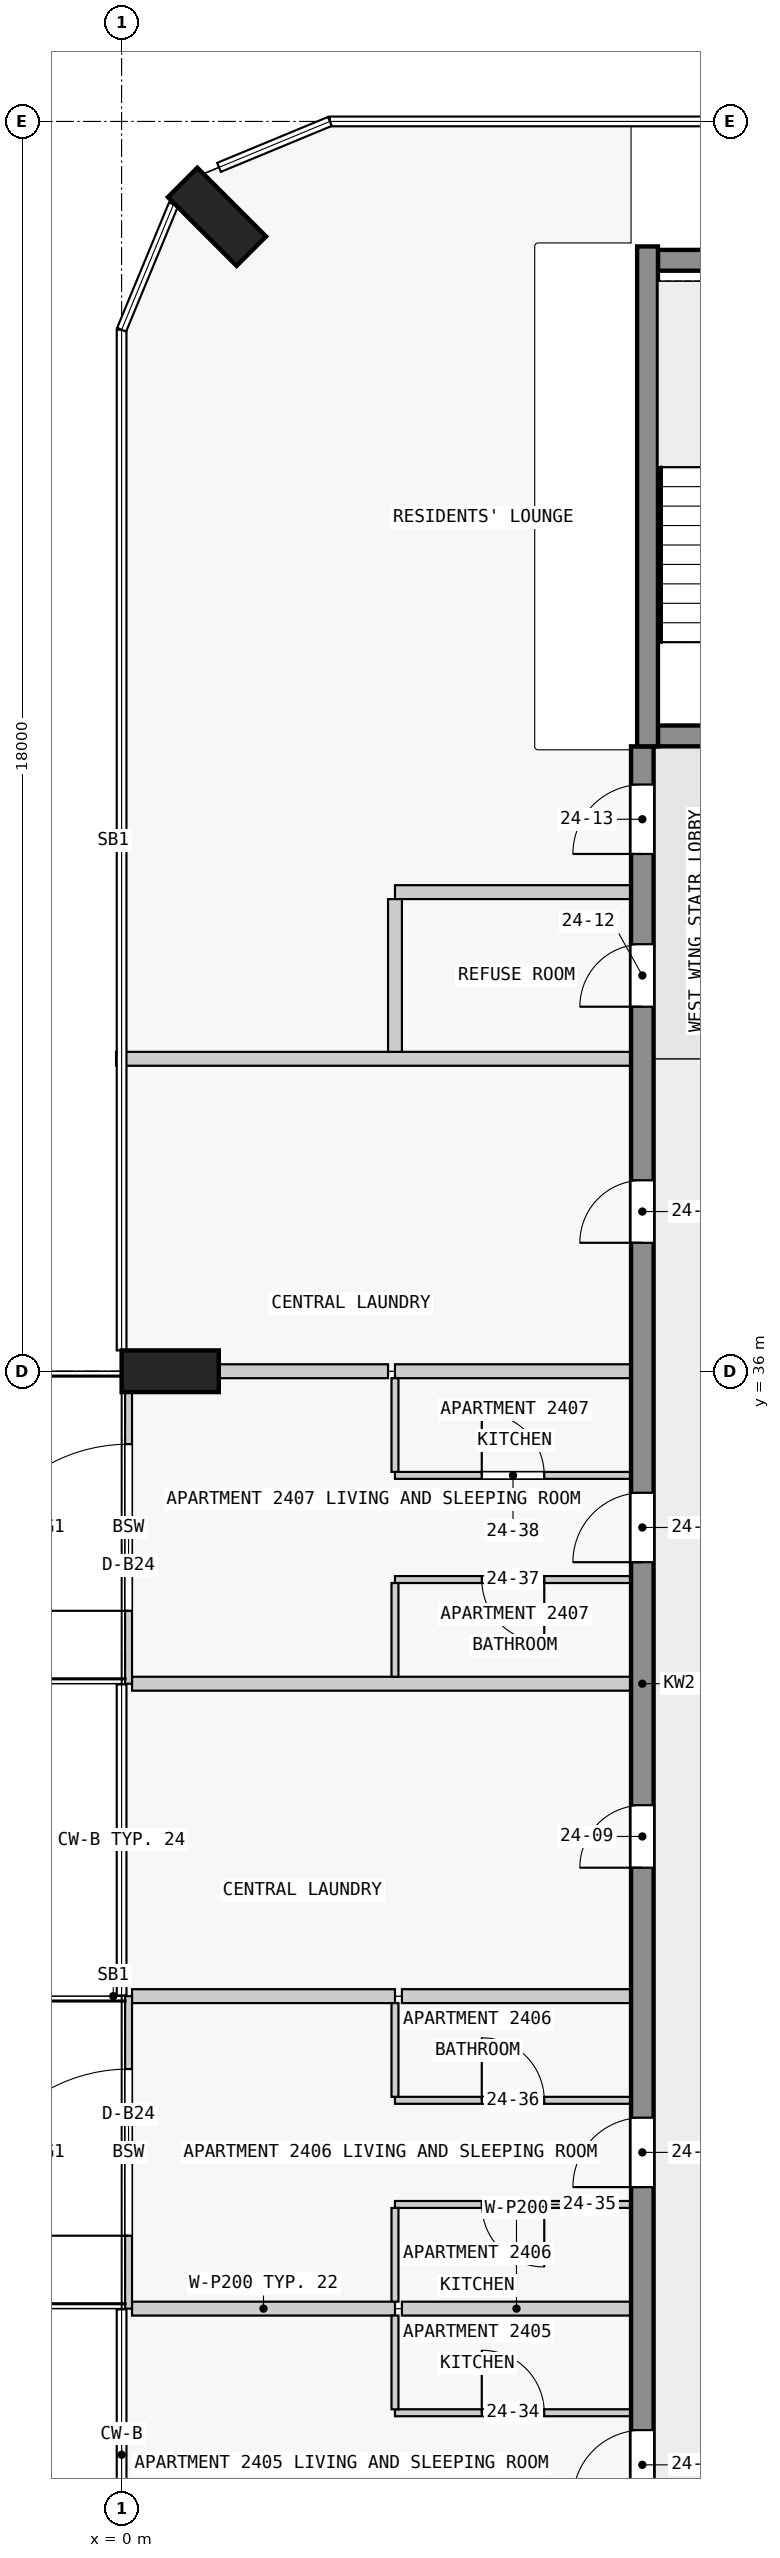
"""IFC4 building model, lengths in metres.
Left out: names, types, materials, properties, quantities, classifications, styles, units other than length and angle.
Written with IfcOpenShell. Run it as: python <this file> out.ifc"""

import sys

from ifc_helpers import new_model, si_unit, direction, frame, frame_2d, origin, origin_2d, place, context, subcontext, project, spatial, rectangle, extrude, element, fill, save


model = new_model("IFC4")
c1 = context("Model", 3, precision=1e-05, world=origin(), true_north=direction((0.0, 1.0)))
c2 = subcontext(c1, "Body", "Model", "MODEL_VIEW")
j1 = project(units=[si_unit("LENGTHUNIT", "METRE"), si_unit("PLANEANGLEUNIT", "RADIAN")], contexts=[c1])
p1 = place(None, origin())
s1 = spatial("IfcSite", under=j1, at=p1, CompositionType="ELEMENT")
p2 = place(p1, origin())
s2 = spatial("IfcBuilding", under=s1, at=p2, CompositionType="ELEMENT")
p3 = place(p2, frame((0.0, 0.0, 95.8)))
s3 = spatial("IfcBuildingStorey", under=s2, at=p3, CompositionType="ELEMENT", Elevation=95.8)
for number, where, z_axis, x_axis in (
    (1, (1.374, 52.626, 0.0), (0.0, 0.0, 1.0), (0.707, 0.707, 0.0)),
    (2, (0.7, 36.0, 0.0), (0.0, 0.0, 1.0), (0.0, 1.0, 0.0)),
):
    element("IfcColumn", number, at=place(p3, frame(where, z_axis=z_axis, x_axis=x_axis)), inside=s3, PredefinedType="COLUMN", context=c2, shape_type="SweptSolid", body=[
        extrude(rectangle(XDim=0.6, YDim=1.4, at=origin_2d()), origin(), (0.0, 0.0, 1.0), 3.5),
    ])
p4 = place(p3, frame((7.725, 45.15, 0.0), z_axis=(0.0, 0.0, 1.0), x_axis=(1.0, 0.0, 0.0)))
e3 = element("IfcWall", 3, at=p4, inside=s3, PredefinedType="SHEAR", context=c2, shape_type="SweptSolid", body=[
    extrude(rectangle(XDim=2.55, YDim=0.3, at=frame_2d((1.275, 0.0))), origin(), (0.0, 0.0, 1.0), 3.5),
])
p5 = place(p4, frame((0.725, 0.0, 0.0)))
e4 = element("IfcOpeningElement", 4, at=p5, cuts=e3, PredefinedType="OPENING", context=c2, shape_type="SweptSolid", body=[
    extrude(rectangle(XDim=1.1, YDim=2.1, at=frame_2d((0.55, 1.05))), frame((0.0, 0.16, 0.0), z_axis=(0.0, -1.0, 0.0), x_axis=(1.0, 0.0, 0.0)), (0.0, 0.0, 1.0), 0.32),
])
p6 = place(p3, frame((7.725, 52.0, 0.0), z_axis=(0.0, 0.0, 1.0), x_axis=(1.0, 0.0, 0.0)))
e5 = element("IfcWall", 5, at=p6, inside=s3, PredefinedType="SHEAR", context=c2, shape_type="SweptSolid", body=[
    extrude(rectangle(XDim=2.55, YDim=0.3, at=frame_2d((1.275, 0.0))), origin(), (0.0, 0.0, 1.0), 3.5),
])
p7 = place(p3, frame((7.575, 45.0, 0.0), z_axis=(0.0, 0.0, 1.0), x_axis=(0.0, 1.0, 0.0)))
e6 = element("IfcWall", 6, at=p7, inside=s3, PredefinedType="SHEAR", context=c2, shape_type="SweptSolid", body=[
    extrude(rectangle(XDim=7.2, YDim=0.3, at=frame_2d((3.6, 0.0))), origin(), (0.0, 0.0, 1.0), 3.5),
])
p8 = place(p3, frame((7.5, 18.0, 0.0), z_axis=(0.0, 0.0, 1.0), x_axis=(0.0, 1.0, 0.0)))
e7 = element("IfcWall", 7, at=p8, inside=s3, PredefinedType="SHEAR", context=c2, shape_type="SweptSolid", body=[
    extrude(rectangle(XDim=27.0, YDim=0.325, at=frame_2d((13.5, 0.0))), origin(), (0.0, 0.0, 1.0), 3.25),
])
p9 = place(p8, frame((1.75, 0.0, 0.0)))
e8 = element("IfcOpeningElement", 8, at=p9, cuts=e7, PredefinedType="OPENING", context=c2, shape_type="SweptSolid", body=[
    extrude(rectangle(XDim=1.0, YDim=2.1, at=frame_2d((0.5, 1.05))), frame((0.0, 0.172, 0.0), z_axis=(0.0, -1.0, 0.0), x_axis=(1.0, 0.0, 0.0)), (0.0, 0.0, 1.0), 0.345),
])
p10 = place(p8, frame((6.25, 0.0, 0.0)))
e9 = element("IfcOpeningElement", 9, at=p10, cuts=e7, PredefinedType="OPENING", context=c2, shape_type="SweptSolid", body=[
    extrude(rectangle(XDim=1.0, YDim=2.1, at=frame_2d((0.5, 1.05))), frame((0.0, 0.172, 0.0), z_axis=(0.0, -1.0, 0.0), x_axis=(1.0, 0.0, 0.0)), (0.0, 0.0, 1.0), 0.345),
])
p11 = place(p8, frame((10.85, 0.0, 0.0)))
e10 = element("IfcOpeningElement", 10, at=p11, cuts=e7, PredefinedType="OPENING", context=c2, shape_type="SweptSolid", body=[
    extrude(rectangle(XDim=0.9, YDim=2.1, at=frame_2d((0.45, 1.05))), frame((0.0, 0.172, 0.0), z_axis=(0.0, -1.0, 0.0), x_axis=(1.0, 0.0, 0.0)), (0.0, 0.0, 1.0), 0.345),
])
p12 = place(p8, frame((15.25, 0.0, 0.0)))
e11 = element("IfcOpeningElement", 11, at=p12, cuts=e7, PredefinedType="OPENING", context=c2, shape_type="SweptSolid", body=[
    extrude(rectangle(XDim=1.0, YDim=2.1, at=frame_2d((0.5, 1.05))), frame((0.0, 0.172, 0.0), z_axis=(0.0, -1.0, 0.0), x_axis=(1.0, 0.0, 0.0)), (0.0, 0.0, 1.0), 0.345),
])
p13 = place(p8, frame((19.85, 0.0, 0.0)))
e12 = element("IfcOpeningElement", 12, at=p13, cuts=e7, PredefinedType="OPENING", context=c2, shape_type="SweptSolid", body=[
    extrude(rectangle(XDim=0.9, YDim=2.1, at=frame_2d((0.45, 1.05))), frame((0.0, 0.172, 0.0), z_axis=(0.0, -1.0, 0.0), x_axis=(1.0, 0.0, 0.0)), (0.0, 0.0, 1.0), 0.345),
])
p14 = place(p8, frame((23.25, 0.0, 0.0)))
e13 = element("IfcOpeningElement", 13, at=p14, cuts=e7, PredefinedType="OPENING", context=c2, shape_type="SweptSolid", body=[
    extrude(rectangle(XDim=0.9, YDim=2.1, at=frame_2d((0.45, 1.05))), frame((0.0, 0.172, 0.0), z_axis=(0.0, -1.0, 0.0), x_axis=(1.0, 0.0, 0.0)), (0.0, 0.0, 1.0), 0.345),
])
p15 = place(p8, frame((25.45, 0.0, 0.0)))
e14 = element("IfcOpeningElement", 14, at=p15, cuts=e7, PredefinedType="OPENING", context=c2, shape_type="SweptSolid", body=[
    extrude(rectangle(XDim=1.0, YDim=2.1, at=frame_2d((0.5, 1.05))), frame((0.0, 0.172, 0.0), z_axis=(0.0, -1.0, 0.0), x_axis=(1.0, 0.0, 0.0)), (0.0, 0.0, 1.0), 0.345),
])
p16 = place(p3, frame((0.1, 22.5, 0.0), z_axis=(0.0, 0.0, 1.0), x_axis=(0.0, 1.0, 0.0)))
e15 = element("IfcWall", 15, at=p16, inside=s3, PredefinedType="STANDARD", context=c2, shape_type="SweptSolid", body=[
    extrude(rectangle(XDim=4.5, YDim=0.1, at=frame_2d((2.25, 0.0))), origin(), (0.0, 0.0, 1.0), 3.25),
])
p17 = place(p16, frame((1.05, 0.0, 0.0)))
e16 = element("IfcOpeningElement", 16, at=p17, cuts=e15, PredefinedType="OPENING", context=c2, shape_type="SweptSolid", body=[
    extrude(rectangle(XDim=2.4, YDim=2.4, at=frame_2d((1.2, 1.2))), frame((0.0, 0.06, 0.0), z_axis=(0.0, -1.0, 0.0), x_axis=(1.0, 0.0, 0.0)), (0.0, 0.0, 1.0), 0.12),
])
p18 = place(p3, frame((0.1, 31.5, 0.0), z_axis=(0.0, 0.0, 1.0), x_axis=(0.0, 1.0, 0.0)))
e17 = element("IfcWall", 17, at=p18, inside=s3, PredefinedType="STANDARD", context=c2, shape_type="SweptSolid", body=[
    extrude(rectangle(XDim=4.5, YDim=0.1, at=frame_2d((2.25, 0.0))), origin(), (0.0, 0.0, 1.0), 3.25),
])
p19 = place(p18, frame((1.05, 0.0, 0.0)))
e18 = element("IfcOpeningElement", 18, at=p19, cuts=e17, PredefinedType="OPENING", context=c2, shape_type="SweptSolid", body=[
    extrude(rectangle(XDim=2.4, YDim=2.4, at=frame_2d((1.2, 1.2))), frame((0.0, 0.06, 0.0), z_axis=(0.0, -1.0, 0.0), x_axis=(1.0, 0.0, 0.0)), (0.0, 0.0, 1.0), 0.12),
])
p20 = place(p3, frame((3.938, 21.0, 0.0), z_axis=(0.0, 0.0, 1.0), x_axis=(1.0, 0.0, 0.0)))
e19 = element("IfcWall", 19, at=p20, inside=s3, PredefinedType="PARTITIONING", context=c2, shape_type="SweptSolid", body=[
    extrude(rectangle(XDim=3.4, YDim=0.1, at=frame_2d((1.7, 0.0))), origin(), (0.0, 0.0, 1.0), 3.25),
])
p21 = place(p20, frame((1.25, 0.0, 0.0)))
e20 = element("IfcOpeningElement", 20, at=p21, cuts=e19, PredefinedType="OPENING", context=c2, shape_type="SweptSolid", body=[
    extrude(rectangle(XDim=0.9, YDim=2.1, at=frame_2d((0.45, 1.05))), frame((0.0, 0.06, 0.0), z_axis=(0.0, -1.0, 0.0), x_axis=(1.0, 0.0, 0.0)), (0.0, 0.0, 1.0), 0.12),
])
p22 = place(p3, frame((7.337, 22.5, 0.0), z_axis=(0.0, 0.0, 1.0), x_axis=(-1.0, 0.0, 0.0)))
e21 = element("IfcWall", 21, at=p22, inside=s3, PredefinedType="PARTITIONING", context=c2, shape_type="SweptSolid", body=[
    extrude(rectangle(XDim=3.3, YDim=0.2, at=frame_2d((1.65, 0.0))), origin(), (0.0, 0.0, 1.0), 3.25),
])
p23 = place(p3, frame((0.15, 22.5, 0.0), z_axis=(0.0, 0.0, 1.0), x_axis=(1.0, 0.0, 0.0)))
e22 = element("IfcWall", 22, at=p23, inside=s3, PredefinedType="PARTITIONING", context=c2, shape_type="SweptSolid", body=[
    extrude(rectangle(XDim=3.788, YDim=0.2, at=frame_2d((1.894, 0.0))), origin(), (0.0, 0.0, 1.0), 3.25),
])
p24 = place(p3, frame((7.337, 24.0, 0.0), z_axis=(0.0, 0.0, 1.0), x_axis=(-1.0, 0.0, 0.0)))
e23 = element("IfcWall", 23, at=p24, inside=s3, PredefinedType="PARTITIONING", context=c2, shape_type="SweptSolid", body=[
    extrude(rectangle(XDim=3.4, YDim=0.1, at=frame_2d((1.7, 0.0))), origin(), (0.0, 0.0, 1.0), 3.25),
])
p25 = place(p24, frame((1.25, 0.0, 0.0)))
e24 = element("IfcOpeningElement", 24, at=p25, cuts=e23, PredefinedType="OPENING", context=c2, shape_type="SweptSolid", body=[
    extrude(rectangle(XDim=0.9, YDim=2.1, at=frame_2d((0.45, 1.05))), frame((0.0, 0.06, 0.0), z_axis=(0.0, -1.0, 0.0), x_axis=(1.0, 0.0, 0.0)), (0.0, 0.0, 1.0), 0.12),
])
p26 = place(p3, frame((3.938, 25.5, 0.0), z_axis=(0.0, 0.0, 1.0), x_axis=(1.0, 0.0, 0.0)))
e25 = element("IfcWall", 25, at=p26, inside=s3, PredefinedType="PARTITIONING", context=c2, shape_type="SweptSolid", body=[
    extrude(rectangle(XDim=3.4, YDim=0.1, at=frame_2d((1.7, 0.0))), origin(), (0.0, 0.0, 1.0), 3.25),
])
p27 = place(p26, frame((1.25, 0.0, 0.0)))
e26 = element("IfcOpeningElement", 26, at=p27, cuts=e25, PredefinedType="OPENING", context=c2, shape_type="SweptSolid", body=[
    extrude(rectangle(XDim=0.9, YDim=2.1, at=frame_2d((0.45, 1.05))), frame((0.0, 0.06, 0.0), z_axis=(0.0, -1.0, 0.0), x_axis=(1.0, 0.0, 0.0)), (0.0, 0.0, 1.0), 0.12),
])
p28 = place(p3, frame((7.337, 27.0, 0.0), z_axis=(0.0, 0.0, 1.0), x_axis=(-1.0, 0.0, 0.0)))
e27 = element("IfcWall", 27, at=p28, inside=s3, PredefinedType="PARTITIONING", context=c2, shape_type="SweptSolid", body=[
    extrude(rectangle(XDim=3.3, YDim=0.2, at=frame_2d((1.65, 0.0))), origin(), (0.0, 0.0, 1.0), 3.25),
])
p29 = place(p3, frame((0.15, 27.0, 0.0), z_axis=(0.0, 0.0, 1.0), x_axis=(1.0, 0.0, 0.0)))
e28 = element("IfcWall", 28, at=p29, inside=s3, PredefinedType="PARTITIONING", context=c2, shape_type="SweptSolid", body=[
    extrude(rectangle(XDim=3.788, YDim=0.2, at=frame_2d((1.894, 0.0))), origin(), (0.0, 0.0, 1.0), 3.25),
])
p30 = place(p3, frame((7.337, 31.5, 0.0), z_axis=(0.0, 0.0, 1.0), x_axis=(-1.0, 0.0, 0.0)))
e29 = element("IfcWall", 29, at=p30, inside=s3, PredefinedType="PARTITIONING", context=c2, shape_type="SweptSolid", body=[
    extrude(rectangle(XDim=7.188, YDim=0.2, at=frame_2d((3.594, 0.0))), origin(), (0.0, 0.0, 1.0), 3.25),
])
p31 = place(p3, frame((7.337, 33.0, 0.0), z_axis=(0.0, 0.0, 1.0), x_axis=(-1.0, 0.0, 0.0)))
e30 = element("IfcWall", 30, at=p31, inside=s3, PredefinedType="PARTITIONING", context=c2, shape_type="SweptSolid", body=[
    extrude(rectangle(XDim=3.4, YDim=0.1, at=frame_2d((1.7, 0.0))), origin(), (0.0, 0.0, 1.0), 3.25),
])
p32 = place(p31, frame((1.25, 0.0, 0.0)))
e31 = element("IfcOpeningElement", 31, at=p32, cuts=e30, PredefinedType="OPENING", context=c2, shape_type="SweptSolid", body=[
    extrude(rectangle(XDim=0.9, YDim=2.1, at=frame_2d((0.45, 1.05))), frame((0.0, 0.06, 0.0), z_axis=(0.0, -1.0, 0.0), x_axis=(1.0, 0.0, 0.0)), (0.0, 0.0, 1.0), 0.12),
])
p33 = place(p3, frame((3.938, 34.5, 0.0), z_axis=(0.0, 0.0, 1.0), x_axis=(1.0, 0.0, 0.0)))
e32 = element("IfcWall", 32, at=p33, inside=s3, PredefinedType="PARTITIONING", context=c2, shape_type="SweptSolid", body=[
    extrude(rectangle(XDim=3.4, YDim=0.1, at=frame_2d((1.7, 0.0))), origin(), (0.0, 0.0, 1.0), 3.25),
])
p34 = place(p33, frame((1.25, 0.0, 0.0)))
e33 = element("IfcOpeningElement", 33, at=p34, cuts=e32, PredefinedType="OPENING", context=c2, shape_type="SweptSolid", body=[
    extrude(rectangle(XDim=0.9, YDim=2.1, at=frame_2d((0.45, 1.05))), frame((0.0, 0.06, 0.0), z_axis=(0.0, -1.0, 0.0), x_axis=(1.0, 0.0, 0.0)), (0.0, 0.0, 1.0), 0.12),
])
p35 = place(p3, frame((7.337, 36.0, 0.0), z_axis=(0.0, 0.0, 1.0), x_axis=(-1.0, 0.0, 0.0)))
e34 = element("IfcWall", 34, at=p35, inside=s3, PredefinedType="PARTITIONING", context=c2, shape_type="SweptSolid", body=[
    extrude(rectangle(XDim=3.4, YDim=0.2, at=frame_2d((1.7, 0.0))), origin(), (0.0, 0.0, 1.0), 3.25),
])
p36 = place(p3, frame((1.4, 36.0, 0.0), z_axis=(0.0, 0.0, 1.0), x_axis=(1.0, 0.0, 0.0)))
e35 = element("IfcWall", 35, at=p36, inside=s3, PredefinedType="PARTITIONING", context=c2, shape_type="SweptSolid", body=[
    extrude(rectangle(XDim=2.438, YDim=0.2, at=frame_2d((1.219, 0.0))), origin(), (0.0, 0.0, 1.0), 3.25),
])
p37 = place(p3, frame((7.337, 40.5, 0.0), z_axis=(0.0, 0.0, 1.0), x_axis=(-1.0, 0.0, 0.0)))
e36 = element("IfcWall", 36, at=p37, inside=s3, PredefinedType="PARTITIONING", context=c2, shape_type="SweptSolid", body=[
    extrude(rectangle(XDim=7.417, YDim=0.2, at=frame_2d((3.709, 0.0))), origin(), (0.0, 0.0, 1.0), 3.25),
])
p38 = place(p3, frame((7.337, 42.9, 0.0), z_axis=(0.0, 0.0, 1.0), x_axis=(-1.0, 0.0, 0.0)))
e37 = element("IfcWall", 37, at=p38, inside=s3, PredefinedType="PARTITIONING", context=c2, shape_type="SweptSolid", body=[
    extrude(rectangle(XDim=3.4, YDim=0.2, at=frame_2d((1.7, 0.0))), origin(), (0.0, 0.0, 1.0), 3.25),
])
for number, where, z_axis, x_axis in (
    (38, (3.938, 22.4, 0.0), (0.0, 0.0, 1.0), (0.0, -1.0, 0.0)),
    (39, (3.938, 23.95, 0.0), (0.0, 0.0, 1.0), (0.0, -1.0, 0.0)),
    (40, (3.938, 26.9, 0.0), (0.0, 0.0, 1.0), (0.0, -1.0, 0.0)),
    (41, (3.938, 32.95, 0.0), (0.0, 0.0, 1.0), (0.0, -1.0, 0.0)),
    (42, (3.938, 35.9, 0.0), (0.0, 0.0, 1.0), (0.0, -1.0, 0.0)),
):
    element("IfcWall", number, at=place(p3, frame(where, z_axis=z_axis, x_axis=x_axis)), inside=s3, PredefinedType="PARTITIONING", context=c2, shape_type="SweptSolid", body=[
        extrude(rectangle(XDim=1.35, YDim=0.1, at=frame_2d((0.675, 0.0))), origin(), (0.0, 0.0, 1.0), 3.25),
    ])
p39 = place(p3, frame((3.938, 42.8, 0.0), z_axis=(0.0, 0.0, 1.0), x_axis=(0.0, -1.0, 0.0)))
e43 = element("IfcWall", 43, at=p39, inside=s3, PredefinedType="PARTITIONING", context=c2, shape_type="SweptSolid", body=[
    extrude(rectangle(XDim=2.2, YDim=0.2, at=frame_2d((1.1, 0.0))), origin(), (0.0, 0.0, 1.0), 3.25),
])
p40 = place(p17, origin())
e44 = element("IfcDoor", 44, at=p40, inside=s3, OperationType="SINGLE_SWING_LEFT", PredefinedType="DOOR", context=c2, shape_type="SweptSolid", body=[
    extrude(rectangle(XDim=2.4, YDim=2.4, at=frame_2d((1.2, 1.2))), frame((0.0, 0.025, 0.0), z_axis=(0.0, -1.0, 0.0), x_axis=(1.0, 0.0, 0.0)), (0.0, 0.0, 1.0), 0.05),
])
fill(e16, e44)
p41 = place(p19, origin())
e45 = element("IfcDoor", 45, at=p41, inside=s3, OperationType="SINGLE_SWING_LEFT", PredefinedType="DOOR", context=c2, shape_type="SweptSolid", body=[
    extrude(rectangle(XDim=2.4, YDim=2.4, at=frame_2d((1.2, 1.2))), frame((0.0, 0.025, 0.0), z_axis=(0.0, -1.0, 0.0), x_axis=(1.0, 0.0, 0.0)), (0.0, 0.0, 1.0), 0.05),
])
fill(e18, e45)
p42 = place(p9, origin())
e46 = element("IfcDoor", 46, at=p42, inside=s3, OperationType="SINGLE_SWING_LEFT", PredefinedType="DOOR", context=c2, shape_type="SweptSolid", body=[
    extrude(rectangle(XDim=1.0, YDim=2.1, at=frame_2d((0.5, 1.05))), frame((0.0, 0.025, 0.0), z_axis=(0.0, -1.0, 0.0), x_axis=(1.0, 0.0, 0.0)), (0.0, 0.0, 1.0), 0.05),
])
fill(e8, e46)
p43 = place(p10, origin())
e47 = element("IfcDoor", 47, at=p43, inside=s3, OperationType="SINGLE_SWING_LEFT", PredefinedType="DOOR", context=c2, shape_type="SweptSolid", body=[
    extrude(rectangle(XDim=1.0, YDim=2.1, at=frame_2d((0.5, 1.05))), frame((0.0, 0.025, 0.0), z_axis=(0.0, -1.0, 0.0), x_axis=(1.0, 0.0, 0.0)), (0.0, 0.0, 1.0), 0.05),
])
fill(e9, e47)
p44 = place(p11, origin())
e48 = element("IfcDoor", 48, at=p44, inside=s3, OperationType="SINGLE_SWING_LEFT", PredefinedType="DOOR", context=c2, shape_type="SweptSolid", body=[
    extrude(rectangle(XDim=0.9, YDim=2.1, at=frame_2d((0.45, 1.05))), frame((0.0, 0.025, 0.0), z_axis=(0.0, -1.0, 0.0), x_axis=(1.0, 0.0, 0.0)), (0.0, 0.0, 1.0), 0.05),
])
fill(e10, e48)
p45 = place(p12, origin())
e49 = element("IfcDoor", 49, at=p45, inside=s3, OperationType="SINGLE_SWING_RIGHT", PredefinedType="DOOR", context=c2, shape_type="SweptSolid", body=[
    extrude(rectangle(XDim=1.0, YDim=2.1, at=frame_2d((0.5, 1.05))), frame((0.0, 0.025, 0.0), z_axis=(0.0, -1.0, 0.0), x_axis=(1.0, 0.0, 0.0)), (0.0, 0.0, 1.0), 0.05),
])
fill(e11, e49)
p46 = place(p13, origin())
e50 = element("IfcDoor", 50, at=p46, inside=s3, OperationType="SINGLE_SWING_RIGHT", PredefinedType="DOOR", context=c2, shape_type="SweptSolid", body=[
    extrude(rectangle(XDim=0.9, YDim=2.1, at=frame_2d((0.45, 1.05))), frame((0.0, 0.025, 0.0), z_axis=(0.0, -1.0, 0.0), x_axis=(1.0, 0.0, 0.0)), (0.0, 0.0, 1.0), 0.05),
])
fill(e12, e50)
p47 = place(p14, origin())
e51 = element("IfcDoor", 51, at=p47, inside=s3, OperationType="SINGLE_SWING_RIGHT", PredefinedType="DOOR", context=c2, shape_type="SweptSolid", body=[
    extrude(rectangle(XDim=0.9, YDim=2.1, at=frame_2d((0.45, 1.05))), frame((0.0, 0.025, 0.0), z_axis=(0.0, -1.0, 0.0), x_axis=(1.0, 0.0, 0.0)), (0.0, 0.0, 1.0), 0.05),
])
fill(e13, e51)
p48 = place(p15, origin())
e52 = element("IfcDoor", 52, at=p48, inside=s3, OperationType="SINGLE_SWING_RIGHT", PredefinedType="DOOR", context=c2, shape_type="SweptSolid", body=[
    extrude(rectangle(XDim=1.0, YDim=2.1, at=frame_2d((0.5, 1.05))), frame((0.0, 0.025, 0.0), z_axis=(0.0, -1.0, 0.0), x_axis=(1.0, 0.0, 0.0)), (0.0, 0.0, 1.0), 0.05),
])
fill(e14, e52)
p49 = place(p21, origin())
e53 = element("IfcDoor", 53, at=p49, inside=s3, OperationType="SINGLE_SWING_LEFT", PredefinedType="DOOR", context=c2, shape_type="SweptSolid", body=[
    extrude(rectangle(XDim=0.9, YDim=2.1, at=frame_2d((0.45, 1.05))), frame((0.0, 0.025, 0.0), z_axis=(0.0, -1.0, 0.0), x_axis=(1.0, 0.0, 0.0)), (0.0, 0.0, 1.0), 0.05),
])
fill(e20, e53)
p50 = place(p25, origin())
e54 = element("IfcDoor", 54, at=p50, inside=s3, OperationType="SINGLE_SWING_LEFT", PredefinedType="DOOR", context=c2, shape_type="SweptSolid", body=[
    extrude(rectangle(XDim=0.9, YDim=2.1, at=frame_2d((0.45, 1.05))), frame((0.0, 0.025, 0.0), z_axis=(0.0, -1.0, 0.0), x_axis=(1.0, 0.0, 0.0)), (0.0, 0.0, 1.0), 0.05),
])
fill(e24, e54)
p51 = place(p27, origin())
e55 = element("IfcDoor", 55, at=p51, inside=s3, OperationType="SINGLE_SWING_LEFT", PredefinedType="DOOR", context=c2, shape_type="SweptSolid", body=[
    extrude(rectangle(XDim=0.9, YDim=2.1, at=frame_2d((0.45, 1.05))), frame((0.0, 0.025, 0.0), z_axis=(0.0, -1.0, 0.0), x_axis=(1.0, 0.0, 0.0)), (0.0, 0.0, 1.0), 0.05),
])
fill(e26, e55)
p52 = place(p32, origin())
e56 = element("IfcDoor", 56, at=p52, inside=s3, OperationType="SINGLE_SWING_LEFT", PredefinedType="DOOR", context=c2, shape_type="SweptSolid", body=[
    extrude(rectangle(XDim=0.9, YDim=2.1, at=frame_2d((0.45, 1.05))), frame((0.0, 0.025, 0.0), z_axis=(0.0, -1.0, 0.0), x_axis=(1.0, 0.0, 0.0)), (0.0, 0.0, 1.0), 0.05),
])
fill(e31, e56)
p53 = place(p34, origin())
e57 = element("IfcDoor", 57, at=p53, inside=s3, OperationType="SINGLE_SWING_LEFT", PredefinedType="DOOR", context=c2, shape_type="SweptSolid", body=[
    extrude(rectangle(XDim=0.9, YDim=2.1, at=frame_2d((0.45, 1.05))), frame((0.0, 0.025, 0.0), z_axis=(0.0, -1.0, 0.0), x_axis=(1.0, 0.0, 0.0)), (0.0, 0.0, 1.0), 0.05),
])
fill(e33, e57)
save(model, sys.argv[1])
